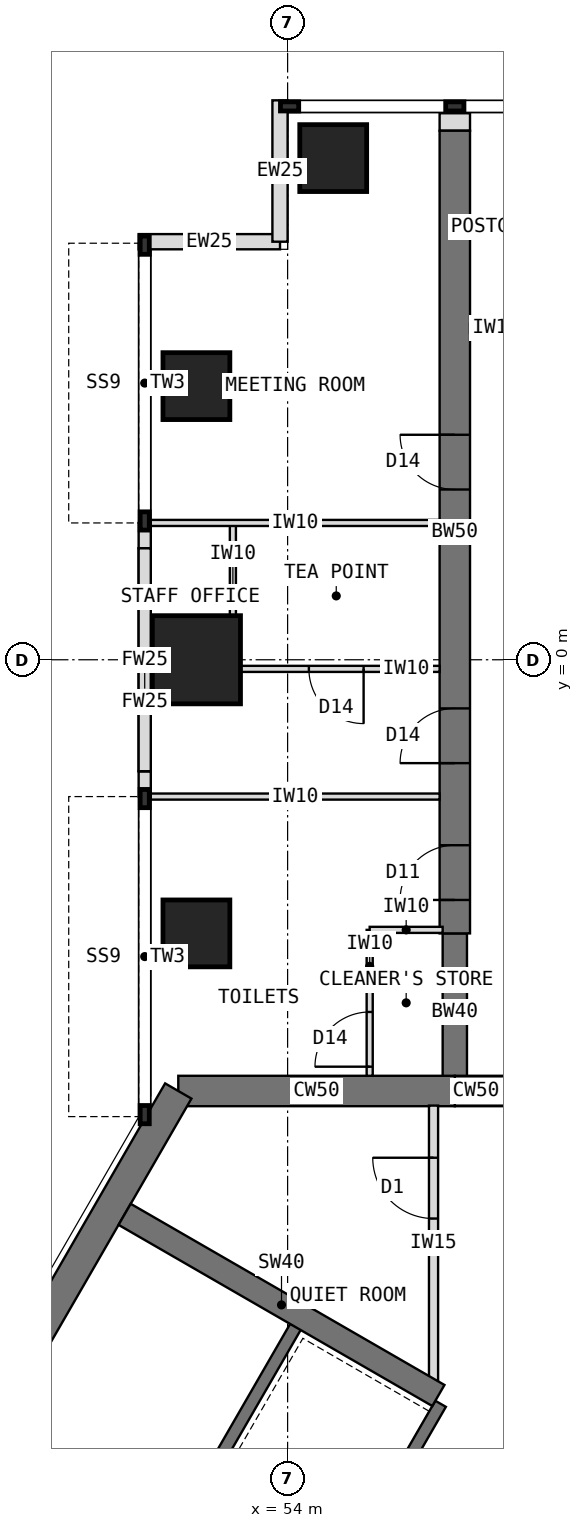
"""IFC4 building model, lengths in metres.
Left out: names, types, materials, properties, quantities, classifications, styles, units other than length and angle.
Written with IfcOpenShell. Run it as: python <this file> out.ifc"""

import sys

from ifc_helpers import new_model, si_unit, direction, frame, frame_2d, origin, origin_2d, place, context, subcontext, project, spatial, rectangle, extrude, element, fill, save


model = new_model("IFC4")
c1 = context("Model", 3, precision=1e-05, world=origin(), true_north=direction((0.0, 1.0)))
c2 = subcontext(c1, "Body", "Model", "MODEL_VIEW")
j1 = project(units=[si_unit("LENGTHUNIT", "METRE"), si_unit("PLANEANGLEUNIT", "RADIAN")], contexts=[c1])
p1 = place(None, origin())
s1 = spatial("IfcSite", under=j1, at=p1, CompositionType="ELEMENT")
p2 = place(p1, origin())
s2 = spatial("IfcBuilding", under=s1, at=p2, CompositionType="ELEMENT")
p3 = place(p2, frame((0.0, 0.0, 234.5)))
s3 = spatial("IfcBuildingStorey", under=s2, at=p3, CompositionType="ELEMENT", Elevation=234.5)
p4 = place(p3, frame((60.25, -7.092, 0.0), z_axis=(0.0, 0.0, 1.0), x_axis=(-1.0, 0.0, 0.0)))
e1 = element("IfcWall", 1, at=p4, inside=s3, PredefinedType="SHEAR", context=c2, shape_type="SweptSolid", body=[
    extrude(rectangle(XDim=3.5, YDim=0.5, at=frame_2d((1.75, 0.0))), origin(), (0.0, 0.0, 1.0), 4.0),
])
p5 = place(p4, frame((0.85, 0.0, 0.0)))
e2 = element("IfcOpeningElement", 2, at=p5, cuts=e1, PredefinedType="OPENING", context=c2, shape_type="SweptSolid", body=[
    extrude(rectangle(XDim=1.8, YDim=2.1, at=frame_2d((0.9, 1.05))), frame((0.0, 0.26, 0.0), z_axis=(0.0, -1.0, 0.0), x_axis=(1.0, 0.0, 0.0)), (0.0, 0.0, 1.0), 0.52),
])
p6 = place(p3, frame((56.75, -7.092, 0.0), z_axis=(0.0, 0.0, 1.0), x_axis=(-1.0, 0.0, 0.0)))
e3 = element("IfcWall", 3, at=p6, inside=s3, PredefinedType="SHEAR", context=c2, shape_type="SweptSolid", body=[
    extrude(rectangle(XDim=4.548, YDim=0.5, at=frame_2d((2.274, 0.0))), origin(), (0.0, 0.0, 1.0), 4.0),
])
p7 = place(p3, frame((52.202, -7.092, 0.0), z_axis=(0.0, 0.0, 1.0), x_axis=(-0.500005998175, -0.866021940709, 0.0)))
e4 = element("IfcWall", 4, at=p7, inside=s3, PredefinedType="SHEAR", context=c2, shape_type="SweptSolid", body=[
    extrude(rectangle(XDim=12.596, YDim=0.5, at=frame_2d((6.298, 0.0))), origin(), (0.0, 0.0, 1.0), 4.0),
])
p8 = place(p3, frame((56.75, -7.092, 0.0), z_axis=(0.0, 0.0, 1.0), x_axis=(0.0, 1.0, 0.0)))
e5 = element("IfcWall", 5, at=p8, inside=s3, PredefinedType="SHEAR", context=c2, shape_type="SweptSolid", body=[
    extrude(rectangle(XDim=2.592, YDim=0.4, at=frame_2d((1.296, 0.0))), origin(), (0.0, 0.0, 1.0), 4.0),
])
p9 = place(p3, frame((56.75, -4.5, 0.0), z_axis=(0.0, 0.0, 1.0), x_axis=(0.0, 1.0, 0.0)))
e6 = element("IfcWall", 6, at=p9, inside=s3, PredefinedType="SHEAR", context=c2, shape_type="SweptSolid", body=[
    extrude(rectangle(XDim=13.2, YDim=0.5, at=frame_2d((6.6, 0.0))), origin(), (0.0, 0.0, 1.0), 4.0),
])
p10 = place(p9, frame((0.55, 0.0, 0.0)))
e7 = element("IfcOpeningElement", 7, at=p10, cuts=e6, PredefinedType="OPENING", context=c2, shape_type="SweptSolid", body=[
    extrude(rectangle(XDim=0.9, YDim=2.1, at=frame_2d((0.45, 1.05))), frame((0.0, 0.26, 0.0), z_axis=(0.0, -1.0, 0.0), x_axis=(1.0, 0.0, 0.0)), (0.0, 0.0, 1.0), 0.52),
])
p11 = place(p9, frame((2.8, 0.0, 0.0)))
e8 = element("IfcOpeningElement", 8, at=p11, cuts=e6, PredefinedType="OPENING", context=c2, shape_type="SweptSolid", body=[
    extrude(rectangle(XDim=0.9, YDim=2.1, at=frame_2d((0.45, 1.05))), frame((0.0, 0.26, 0.0), z_axis=(0.0, -1.0, 0.0), x_axis=(1.0, 0.0, 0.0)), (0.0, 0.0, 1.0), 0.52),
])
p12 = place(p9, frame((7.3, 0.0, 0.0)))
e9 = element("IfcOpeningElement", 9, at=p12, cuts=e6, PredefinedType="OPENING", context=c2, shape_type="SweptSolid", body=[
    extrude(rectangle(XDim=0.9, YDim=2.1, at=frame_2d((0.45, 1.05))), frame((0.0, 0.26, 0.0), z_axis=(0.0, -1.0, 0.0), x_axis=(1.0, 0.0, 0.0)), (0.0, 0.0, 1.0), 0.52),
])
p13 = place(p3, frame((52.5, -4.5, 0.0), z_axis=(0.0, 0.0, 1.0), x_axis=(1.0, 0.0, 0.0)))
e10 = element("IfcColumn", 10, at=p13, inside=s3, PredefinedType="COLUMN", context=c2, shape_type="SweptSolid", body=[
    extrude(rectangle(XDim=1.1, YDim=1.1, at=origin_2d()), origin(), (0.0, 0.0, 1.0), 4.0),
])
p14 = place(p3, frame((52.5, 0.0, 0.0), z_axis=(0.0, 0.0, 1.0), x_axis=(1.0, 0.0, 0.0)))
e11 = element("IfcColumn", 11, at=p14, inside=s3, PredefinedType="COLUMN", context=c2, shape_type="SweptSolid", body=[
    extrude(rectangle(XDim=1.45, YDim=1.45, at=origin_2d()), origin(), (0.0, 0.0, 1.0), 4.0),
])
for number, where, z_axis, x_axis in (
    (12, (52.5, 4.5, 0.0), (0.0, 0.0, 1.0), (1.0, 0.0, 0.0)),
    (13, (54.75, 8.25, 0.0), (0.0, 0.0, 1.0), (1.0, 0.0, 0.0)),
):
    element("IfcColumn", number, at=place(p3, frame(where, z_axis=z_axis, x_axis=x_axis)), inside=s3, PredefinedType="COLUMN", context=c2, shape_type="SweptSolid", body=[
        extrude(rectangle(XDim=1.1, YDim=1.1, at=origin_2d()), origin(), (0.0, 0.0, 1.0), 4.0),
    ])
for number, where, z_axis, x_axis in (
    (14, (51.65, -2.25, 0.0), (0.0, 0.0, 1.0), (0.0, 1.0, 0.0)),
    (15, (51.65, 1.833, 0.0), (0.0, 0.0, 1.0), (0.0, 1.0, 0.0)),
):
    element("IfcWall", number, at=place(p3, frame(where, z_axis=z_axis, x_axis=x_axis)), inside=s3, PredefinedType="STANDARD", context=c2, shape_type="SweptSolid", body=[
        extrude(rectangle(XDim=0.417, YDim=0.2, at=frame_2d((0.208, 0.0))), origin(), (0.0, 0.0, 1.0), 4.0),
    ])
p15 = place(p3, frame((51.65, -1.833, 0.0), z_axis=(0.0, 0.0, 1.0), x_axis=(0.0, 1.0, 0.0)))
e16 = element("IfcWall", 16, at=p15, inside=s3, PredefinedType="STANDARD", context=c2, shape_type="SweptSolid", body=[
    extrude(rectangle(XDim=3.666, YDim=0.2, at=frame_2d((1.833, 0.0))), origin(), (0.0, 0.0, 1.0), 1.306),
])
p16 = place(p3, frame((51.65, -1.833, 2.516), z_axis=(0.0, 0.0, 1.0), x_axis=(0.0, 1.0, 0.0)))
e17 = element("IfcWall", 17, at=p16, inside=s3, PredefinedType="STANDARD", context=c2, shape_type="SweptSolid", body=[
    extrude(rectangle(XDim=3.666, YDim=0.2, at=frame_2d((1.833, 0.0))), origin(), (0.0, 0.0, 1.0), 1.484),
])
for number, where, z_axis, x_axis in (
    (18, (51.55, 6.875, 0.0), (0.0, 0.0, 1.0), (1.0, 0.0, 0.0)),
    (19, (53.875, 6.875, 0.0), (0.0, 0.0, 1.0), (0.0, 1.0, 0.0)),
):
    element("IfcWall", number, at=place(p3, frame(where, z_axis=z_axis, x_axis=x_axis)), inside=s3, PredefinedType="STANDARD", context=c2, shape_type="SweptSolid", body=[
        extrude(rectangle(XDim=2.325, YDim=0.25, at=frame_2d((1.163, 0.0))), origin(), (0.0, 0.0, 1.0), 3.7),
    ])
p17 = place(p3, frame((56.75, 8.7, 0.0), z_axis=(0.0, 0.0, 1.0), x_axis=(0.0, 1.0, 0.0)))
e20 = element("IfcWall", 20, at=p17, inside=s3, PredefinedType="PARTITIONING", context=c2, shape_type="SweptSolid", body=[
    extrude(rectangle(XDim=0.288, YDim=0.5, at=frame_2d((0.144, 0.0))), origin(), (0.0, 0.0, 1.0), 3.7),
])
p18 = place(p3, frame((56.516, -12.236, 0.0), z_axis=(0.0, 0.0, 1.0), x_axis=(-0.49999894854, -0.866026010844, 0.0)))
e21 = element("IfcWall", 21, at=p18, inside=s3, PredefinedType="SHEAR", context=c2, shape_type="SweptSolid", body=[
    extrude(rectangle(XDim=8.0, YDim=0.2, at=frame_2d((4.0, 0.0))), origin(), (0.0, 0.0, 1.0), 4.0),
])
p19 = place(p18, frame((6.3, 0.0, 0.0)))
e22 = element("IfcOpeningElement", 22, at=p19, cuts=e21, PredefinedType="OPENING", context=c2, shape_type="SweptSolid", body=[
    extrude(rectangle(XDim=1.2, YDim=2.1, at=frame_2d((0.6, 1.05))), frame((0.0, 0.11, 0.0), z_axis=(0.0, -1.0, 0.0), x_axis=(1.0, 0.0, 0.0)), (0.0, 0.0, 1.0), 0.22),
])
p20 = place(p3, frame((54.178, -10.886, 0.0), z_axis=(0.0, 0.0, 1.0), x_axis=(-0.49999894854, -0.866026010844, 0.0)))
e23 = element("IfcWall", 23, at=p20, inside=s3, PredefinedType="SHEAR", context=c2, shape_type="SweptSolid", body=[
    extrude(rectangle(XDim=8.0, YDim=0.2, at=frame_2d((4.0, 0.0))), origin(), (0.0, 0.0, 1.0), 4.0),
])
p21 = place(p20, frame((6.8, 0.0, 0.0)))
e24 = element("IfcOpeningElement", 24, at=p21, cuts=e23, PredefinedType="OPENING", context=c2, shape_type="SweptSolid", body=[
    extrude(rectangle(XDim=0.9, YDim=2.1, at=frame_2d((0.45, 1.05))), frame((0.0, 0.11, 0.0), z_axis=(0.0, -1.0, 0.0), x_axis=(1.0, 0.0, 0.0)), (0.0, 0.0, 1.0), 0.22),
])
p22 = place(p3, frame((56.48, -12.099, 0.0), z_axis=(0.0, 0.0, 1.0), x_axis=(-0.86602319114, 0.500003832394, 0.0)))
e25 = element("IfcWall", 25, at=p22, inside=s3, PredefinedType="SHEAR", context=c2, shape_type="SweptSolid", body=[
    extrude(rectangle(XDim=5.958, YDim=0.4, at=frame_2d((2.979, 0.0))), origin(), (0.0, 0.0, 1.0), 4.0),
])
for number, where, z_axis, x_axis in (
    (26, (56.5, -2.25, 0.0), (0.0, 0.0, 1.0), (-1.0, 0.0, 0.0)),
    (27, (56.5, 2.25, 0.0), (0.0, 0.0, 1.0), (-1.0, 0.0, 0.0)),
):
    element("IfcWall", number, at=place(p3, frame(where, z_axis=z_axis, x_axis=x_axis)), inside=s3, PredefinedType="PARTITIONING", context=c2, shape_type="SweptSolid", body=[
        extrude(rectangle(XDim=4.75, YDim=0.1, at=frame_2d((2.375, 0.0))), origin(), (0.0, 0.0, 1.0), 3.7),
    ])
p23 = place(p3, frame((53.1, -0.15, 0.0), z_axis=(0.0, 0.0, 1.0), x_axis=(0.0, 1.0, 0.0)))
e28 = element("IfcWall", 28, at=p23, inside=s3, PredefinedType="PARTITIONING", context=c2, shape_type="SweptSolid", body=[
    extrude(rectangle(XDim=2.4, YDim=0.1, at=frame_2d((1.2, 0.0))), origin(), (0.0, 0.0, 1.0), 3.7),
])
p24 = place(p3, frame((56.5, -0.15, 0.0), z_axis=(0.0, 0.0, 1.0), x_axis=(-1.0, 0.0, 0.0)))
e29 = element("IfcWall", 29, at=p24, inside=s3, PredefinedType="PARTITIONING", context=c2, shape_type="SweptSolid", body=[
    extrude(rectangle(XDim=3.4, YDim=0.1, at=frame_2d((1.7, 0.0))), origin(), (0.0, 0.0, 1.0), 3.7),
])
p25 = place(p24, frame((1.25, 0.0, 0.0)))
e30 = element("IfcOpeningElement", 30, at=p25, cuts=e29, PredefinedType="OPENING", context=c2, shape_type="SweptSolid", body=[
    extrude(rectangle(XDim=0.9, YDim=2.1, at=frame_2d((0.45, 1.05))), frame((0.0, 0.06, 0.0), z_axis=(0.0, -1.0, 0.0), x_axis=(1.0, 0.0, 0.0)), (0.0, 0.0, 1.0), 0.12),
])
p26 = place(p3, frame((55.35, -6.842, 0.0), z_axis=(0.0, 0.0, 1.0), x_axis=(0.0, 1.0, 0.0)))
e31 = element("IfcWall", 31, at=p26, inside=s3, PredefinedType="PARTITIONING", context=c2, shape_type="SweptSolid", body=[
    extrude(rectangle(XDim=2.4, YDim=0.1, at=frame_2d((1.2, 0.0))), origin(), (0.0, 0.0, 1.0), 3.7),
])
p27 = place(p26, frame((0.15, 0.0, 0.0)))
e32 = element("IfcOpeningElement", 32, at=p27, cuts=e31, PredefinedType="OPENING", context=c2, shape_type="SweptSolid", body=[
    extrude(rectangle(XDim=0.9, YDim=2.1, at=frame_2d((0.45, 1.05))), frame((0.0, 0.06, 0.0), z_axis=(0.0, -1.0, 0.0), x_axis=(1.0, 0.0, 0.0)), (0.0, 0.0, 1.0), 0.12),
])
p28 = place(p3, frame((56.55, -4.442, 0.0), z_axis=(0.0, 0.0, 1.0), x_axis=(-1.0, 0.0, 0.0)))
e33 = element("IfcWall", 33, at=p28, inside=s3, PredefinedType="PARTITIONING", context=c2, shape_type="SweptSolid", body=[
    extrude(rectangle(XDim=1.2, YDim=0.1, at=frame_2d((0.6, 0.0))), origin(), (0.0, 0.0, 1.0), 3.167),
])
p29 = place(p3, frame((56.4, -11.857, 0.0), z_axis=(0.0, 0.0, 1.0), x_axis=(0.0, 1.0, 0.0)))
e34 = element("IfcWall", 34, at=p29, inside=s3, PredefinedType="PARTITIONING", context=c2, shape_type="SweptSolid", body=[
    extrude(rectangle(XDim=4.526, YDim=0.15, at=frame_2d((2.263, 0.0))), origin(), (0.0, 0.0, 1.0), 3.7),
])
p30 = place(p29, frame((2.668, 0.0, 0.0)))
e35 = element("IfcOpeningElement", 35, at=p30, cuts=e34, PredefinedType="OPENING", context=c2, shape_type="SweptSolid", body=[
    extrude(rectangle(XDim=1.0, YDim=2.1, at=frame_2d((0.5, 1.05))), frame((0.0, 0.085, 0.0), z_axis=(0.0, -1.0, 0.0), x_axis=(1.0, 0.0, 0.0)), (0.0, 0.0, 1.0), 0.17),
])
p31 = place(p3, frame((60.0, 5.45, 0.0), z_axis=(0.0, 0.0, 1.0), x_axis=(-1.0, 0.0, 0.0)))
e36 = element("IfcWall", 36, at=p31, inside=s3, PredefinedType="PARTITIONING", context=c2, shape_type="SweptSolid", body=[
    extrude(rectangle(XDim=3.0, YDim=0.15, at=frame_2d((1.5, 0.0))), origin(), (0.0, 0.0, 1.0), 3.7),
])
p32 = place(p31, frame((1.0, 0.0, 0.0)))
e37 = element("IfcOpeningElement", 37, at=p32, cuts=e36, PredefinedType="OPENING", context=c2, shape_type="SweptSolid", body=[
    extrude(rectangle(XDim=1.0, YDim=2.1, at=frame_2d((0.5, 1.05))), frame((0.0, 0.085, 0.0), z_axis=(0.0, -1.0, 0.0), x_axis=(1.0, 0.0, 0.0)), (0.0, 0.0, 1.0), 0.17),
])
p33 = place(p25, origin())
e38 = element("IfcDoor", 38, at=p33, inside=s3, OperationType="SINGLE_SWING_LEFT", PredefinedType="DOOR", context=c2, shape_type="SweptSolid", body=[
    extrude(rectangle(XDim=0.9, YDim=2.1, at=frame_2d((0.45, 1.05))), frame((0.0, 0.025, 0.0), z_axis=(0.0, -1.0, 0.0), x_axis=(1.0, 0.0, 0.0)), (0.0, 0.0, 1.0), 0.05),
])
fill(e30, e38)
p34 = place(p27, origin())
e39 = element("IfcDoor", 39, at=p34, inside=s3, OperationType="SINGLE_SWING_LEFT", PredefinedType="DOOR", context=c2, shape_type="SweptSolid", body=[
    extrude(rectangle(XDim=0.9, YDim=2.1, at=frame_2d((0.45, 1.05))), frame((0.0, 0.025, 0.0), z_axis=(0.0, -1.0, 0.0), x_axis=(1.0, 0.0, 0.0)), (0.0, 0.0, 1.0), 0.05),
])
fill(e32, e39)
p35 = place(p30, origin())
e40 = element("IfcDoor", 40, at=p35, inside=s3, OperationType="SINGLE_SWING_RIGHT", PredefinedType="DOOR", context=c2, shape_type="SweptSolid", body=[
    extrude(rectangle(XDim=1.0, YDim=2.1, at=frame_2d((0.5, 1.05))), frame((0.0, 0.025, 0.0), z_axis=(0.0, -1.0, 0.0), x_axis=(1.0, 0.0, 0.0)), (0.0, 0.0, 1.0), 0.05),
])
fill(e35, e40)
p36 = place(p10, origin())
e41 = element("IfcDoor", 41, at=p36, inside=s3, OperationType="SINGLE_SWING_LEFT", PredefinedType="DOOR", context=c2, shape_type="SweptSolid", body=[
    extrude(rectangle(XDim=0.9, YDim=2.1, at=frame_2d((0.45, 1.05))), frame((0.0, 0.025, 0.0), z_axis=(0.0, -1.0, 0.0), x_axis=(1.0, 0.0, 0.0)), (0.0, 0.0, 1.0), 0.05),
])
fill(e7, e41)
p37 = place(p11, origin())
e42 = element("IfcDoor", 42, at=p37, inside=s3, OperationType="SINGLE_SWING_LEFT", PredefinedType="DOOR", context=c2, shape_type="SweptSolid", body=[
    extrude(rectangle(XDim=0.9, YDim=2.1, at=frame_2d((0.45, 1.05))), frame((0.0, 0.025, 0.0), z_axis=(0.0, -1.0, 0.0), x_axis=(1.0, 0.0, 0.0)), (0.0, 0.0, 1.0), 0.05),
])
fill(e8, e42)
p38 = place(p12, origin())
e43 = element("IfcDoor", 43, at=p38, inside=s3, OperationType="SINGLE_SWING_RIGHT", PredefinedType="DOOR", context=c2, shape_type="SweptSolid", body=[
    extrude(rectangle(XDim=0.9, YDim=2.1, at=frame_2d((0.45, 1.05))), frame((0.0, 0.025, 0.0), z_axis=(0.0, -1.0, 0.0), x_axis=(1.0, 0.0, 0.0)), (0.0, 0.0, 1.0), 0.05),
])
fill(e9, e43)
save(model, sys.argv[1])
